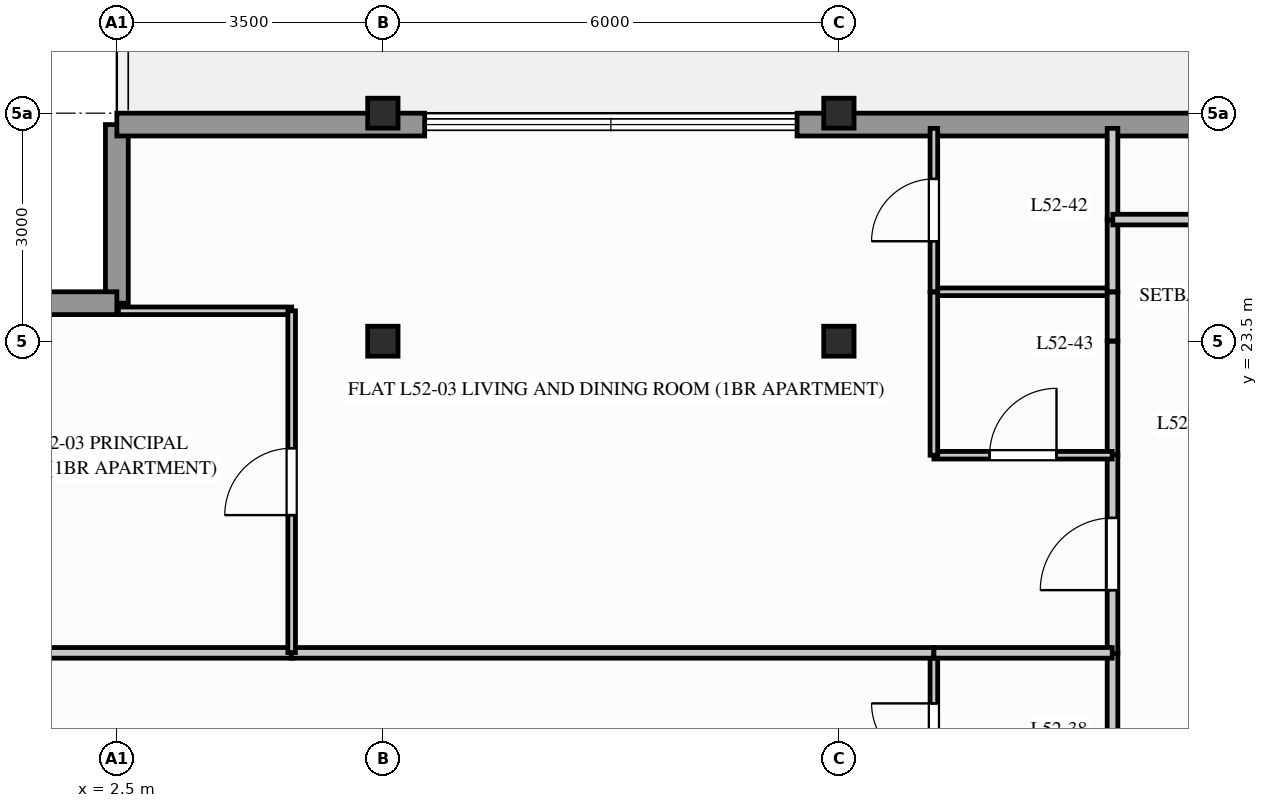
"""IFC4 building model, lengths in metres.
Left out: names, types, materials, properties, quantities, classifications, styles, units other than length and angle.
Written with IfcOpenShell. Run it as: python <this file> out.ifc"""

import sys

from ifc_helpers import new_model, si_unit, direction, frame, frame_2d, origin, origin_2d, place, context, subcontext, project, spatial, rectangle, i_section, extrude, element, fill, save


model = new_model("IFC4")
c1 = context("Model", 3, precision=1e-05, world=origin(), true_north=direction((0.0, 1.0)))
c2 = subcontext(c1, "Body", "Model", "MODEL_VIEW")
j1 = project(units=[si_unit("LENGTHUNIT", "METRE"), si_unit("PLANEANGLEUNIT", "RADIAN")], contexts=[c1])
p1 = place(None, origin())
s1 = spatial("IfcSite", under=j1, at=p1, CompositionType="ELEMENT")
p2 = place(p1, origin())
s2 = spatial("IfcBuilding", under=s1, at=p2, CompositionType="ELEMENT")
p3 = place(p2, frame((0.0, 0.0, 172.8)))
s3 = spatial("IfcBuildingStorey", under=s2, at=p3, CompositionType="ELEMENT", Elevation=172.8)
for number, where, z_axis, x_axis in (
    (1, (6.0, 23.5, 0.0), (0.0, 0.0, 1.0), (1.0, 0.0, 0.0)),
    (2, (6.0, 26.5, 0.0), (0.0, 0.0, 1.0), (1.0, 0.0, 0.0)),
    (3, (12.0, 23.5, 0.0), (0.0, 0.0, 1.0), (1.0, 0.0, 0.0)),
    (4, (12.0, 26.5, 0.0), (0.0, 0.0, 1.0), (1.0, 0.0, 0.0)),
):
    element("IfcColumn", number, at=place(p3, frame(where, z_axis=z_axis, x_axis=x_axis)), inside=s3, PredefinedType="COLUMN", context=c2, shape_type="SweptSolid", body=[
        extrude(i_section(OverallWidth=0.399, OverallDepth=0.394, WebThickness=0.023, FlangeThickness=0.037, FilletRadius=0.015, at=origin_2d()), origin(), (0.0, 0.0, 1.0), 3.1),
    ])
for number, where, z_axis, x_axis in (
    (5, (2.5, 26.35, 0.0), (0.0, 0.0, 1.0), (0.0, -1.0, 0.0)),
    (6, (2.5, 24.0, 0.0), (0.0, 0.0, 1.0), (-1.0, 0.0, 0.0)),
):
    element("IfcWall", number, at=place(p3, frame(where, z_axis=z_axis, x_axis=x_axis)), inside=s3, PredefinedType="STANDARD", context=c2, shape_type="SweptSolid", body=[
        extrude(rectangle(XDim=2.35, YDim=0.3, at=frame_2d((1.175, 0.0))), origin(), (0.0, 0.0, 1.0), 2.89),
    ])
p4 = place(p3, frame((2.5, 26.35, 0.0), z_axis=(0.0, 0.0, 1.0), x_axis=(1.0, 0.0, 0.0)))
e7 = element("IfcWall", 7, at=p4, inside=s3, PredefinedType="STANDARD", context=c2, shape_type="SweptSolid", body=[
    extrude(rectangle(XDim=4.05, YDim=0.3, at=frame_2d((2.025, 0.0))), origin(), (0.0, 0.0, 1.0), 2.89),
])
p5 = place(p3, frame((11.45, 26.35, 0.0), z_axis=(0.0, 0.0, 1.0), x_axis=(1.0, 0.0, 0.0)))
e8 = element("IfcWall", 8, at=p5, inside=s3, PredefinedType="STANDARD", context=c2, shape_type="SweptSolid", body=[
    extrude(rectangle(XDim=6.05, YDim=0.3, at=frame_2d((3.025, 0.0))), origin(), (0.0, 0.0, 1.0), 2.332),
])
p6 = place(p3, frame((15.6, 17.239, 0.0), z_axis=(0.0, 0.0, 1.0), x_axis=(0.0, 1.0, 0.0)))
e9 = element("IfcWall", 9, at=p6, inside=s3, PredefinedType="PARTITIONING", context=c2, shape_type="SweptSolid", body=[
    extrude(rectangle(XDim=2.173, YDim=0.14, at=frame_2d((1.086, 0.0))), origin(), (0.0, 0.0, 1.0), 2.89),
])
p7 = place(p3, frame((15.6, 21.989, 0.0), z_axis=(0.0, 0.0, 1.0), x_axis=(0.0, 1.0, 0.0)))
e10 = element("IfcWall", 10, at=p7, inside=s3, PredefinedType="PARTITIONING", context=c2, shape_type="SweptSolid", body=[
    extrude(rectangle(XDim=1.511, YDim=0.14, at=frame_2d((0.756, 0.0))), origin(), (0.0, 0.0, 1.0), 2.253),
])
p8 = place(p3, frame((15.6, 19.393, 0.0), z_axis=(0.0, 0.0, 1.0), x_axis=(0.0, 1.0, 0.0)))
e11 = element("IfcWall", 11, at=p8, inside=s3, PredefinedType="PARTITIONING", context=c2, shape_type="SweptSolid", body=[
    extrude(rectangle(XDim=2.615, YDim=0.14, at=frame_2d((1.307, 0.0))), origin(), (0.0, 0.0, 1.0), 2.562),
])
p9 = place(p8, frame((0.832, 0.0, 0.0)))
e12 = element("IfcOpeningElement", 12, at=p9, cuts=e11, PredefinedType="OPENING", context=c2, shape_type="SweptSolid", body=[
    extrude(rectangle(XDim=0.95, YDim=2.05, at=frame_2d((0.475, 1.025))), frame((0.0, 0.08, 0.0), z_axis=(0.0, -1.0, 0.0), x_axis=(1.0, 0.0, 0.0)), (0.0, 0.0, 1.0), 0.16),
])
p10 = place(p3, frame((13.25, 17.25, 0.0), z_axis=(0.0, 0.0, 1.0), x_axis=(0.0, 1.0, 0.0)))
e13 = element("IfcWall", 13, at=p10, inside=s3, PredefinedType="PARTITIONING", context=c2, shape_type="SweptSolid", body=[
    extrude(rectangle(XDim=2.15, YDim=0.1, at=frame_2d((1.075, 0.0))), origin(), (0.0, 0.0, 1.0), 2.89),
])
p11 = place(p10, frame((0.665, 0.0, 0.0)))
e14 = element("IfcOpeningElement", 14, at=p11, cuts=e13, PredefinedType="OPENING", context=c2, shape_type="SweptSolid", body=[
    extrude(rectangle(XDim=0.82, YDim=2.02, at=frame_2d((0.41, 1.01))), frame((0.0, 0.06, 0.0), z_axis=(0.0, -1.0, 0.0), x_axis=(1.0, 0.0, 0.0)), (0.0, 0.0, 1.0), 0.12),
])
p12 = place(p3, frame((13.25, 19.4, 0.0), z_axis=(0.0, 0.0, 1.0), x_axis=(1.0, 0.0, 0.0)))
e15 = element("IfcWall", 15, at=p12, inside=s3, PredefinedType="PARTITIONING", context=c2, shape_type="SweptSolid", body=[
    extrude(rectangle(XDim=2.346, YDim=0.14, at=frame_2d((1.173, 0.0))), origin(), (0.0, 0.0, 1.0), 2.89),
])
p13 = place(p3, frame((0.2, 19.4, 0.0), z_axis=(0.0, 0.0, 1.0), x_axis=(1.0, 0.0, 0.0)))
e16 = element("IfcWall", 16, at=p13, inside=s3, PredefinedType="PARTITIONING", context=c2, shape_type="SweptSolid", body=[
    extrude(rectangle(XDim=4.611, YDim=0.14, at=frame_2d((2.306, 0.0))), origin(), (0.0, 0.0, 1.0), 2.89),
])
p14 = place(p3, frame((4.793, 19.4, 0.0), z_axis=(0.0, 0.0, 1.0), x_axis=(1.0, 0.0, 0.0)))
e17 = element("IfcWall", 17, at=p14, inside=s3, PredefinedType="PARTITIONING", context=c2, shape_type="SweptSolid", body=[
    extrude(rectangle(XDim=8.453, YDim=0.14, at=frame_2d((4.227, 0.0))), origin(), (0.0, 0.0, 1.0), 2.253),
])
p15 = place(p3, frame((13.25, 24.15, 0.0), z_axis=(0.0, 0.0, 1.0), x_axis=(1.0, 0.0, 0.0)))
e18 = element("IfcWall", 18, at=p15, inside=s3, PredefinedType="PARTITIONING", context=c2, shape_type="SweptSolid", body=[
    extrude(rectangle(XDim=2.35, YDim=0.1, at=frame_2d((1.175, 0.0))), origin(), (0.0, 0.0, 1.0), 2.89),
])
p16 = place(p3, frame((13.25, 24.15, 0.0), z_axis=(0.0, 0.0, 1.0), x_axis=(0.0, 1.0, 0.0)))
e19 = element("IfcWall", 19, at=p16, inside=s3, PredefinedType="PARTITIONING", context=c2, shape_type="SweptSolid", body=[
    extrude(rectangle(XDim=2.15, YDim=0.1, at=frame_2d((1.075, 0.0))), origin(), (0.0, 0.0, 1.0), 2.89),
])
p17 = place(p16, frame((0.665, 0.0, 0.0)))
e20 = element("IfcOpeningElement", 20, at=p17, cuts=e19, PredefinedType="OPENING", context=c2, shape_type="SweptSolid", body=[
    extrude(rectangle(XDim=0.82, YDim=2.02, at=frame_2d((0.41, 1.01))), frame((0.0, 0.06, 0.0), z_axis=(0.0, -1.0, 0.0), x_axis=(1.0, 0.0, 0.0)), (0.0, 0.0, 1.0), 0.12),
])
p18 = place(p3, frame((15.6, 24.15, 0.0), z_axis=(0.0, 0.0, 1.0), x_axis=(0.0, 1.0, 0.0)))
e21 = element("IfcWall", 21, at=p18, inside=s3, PredefinedType="PARTITIONING", context=c2, shape_type="SweptSolid", body=[
    extrude(rectangle(XDim=0.961, YDim=0.14, at=frame_2d((0.481, 0.0))), origin(), (0.0, 0.0, 1.0), 2.89),
])
p19 = place(p3, frame((15.6, 25.093, 0.0), z_axis=(0.0, 0.0, 1.0), x_axis=(0.0, 1.0, 0.0)))
e22 = element("IfcWall", 22, at=p19, inside=s3, PredefinedType="PARTITIONING", context=c2, shape_type="SweptSolid", body=[
    extrude(rectangle(XDim=1.207, YDim=0.14, at=frame_2d((0.604, 0.0))), origin(), (0.0, 0.0, 1.0), 2.89),
])
p20 = place(p3, frame((13.25, 22.0, 0.0), z_axis=(0.0, 0.0, 1.0), x_axis=(1.0, 0.0, 0.0)))
e23 = element("IfcWall", 23, at=p20, inside=s3, PredefinedType="PARTITIONING", context=c2, shape_type="SweptSolid", body=[
    extrude(rectangle(XDim=2.346, YDim=0.1, at=frame_2d((1.173, 0.0))), origin(), (0.0, 0.0, 1.0), 2.89),
])
p21 = place(p20, frame((0.733, 0.0, 0.0)))
e24 = element("IfcOpeningElement", 24, at=p21, cuts=e23, PredefinedType="OPENING", context=c2, shape_type="SweptSolid", body=[
    extrude(rectangle(XDim=0.88, YDim=2.04, at=frame_2d((0.44, 1.02))), frame((0.0, 0.06, 0.0), z_axis=(0.0, -1.0, 0.0), x_axis=(1.0, 0.0, 0.0)), (0.0, 0.0, 1.0), 0.12),
])
p22 = place(p3, frame((13.25, 22.0, 0.0), z_axis=(0.0, 0.0, 1.0), x_axis=(0.0, 1.0, 0.0)))
e25 = element("IfcWall", 25, at=p22, inside=s3, PredefinedType="PARTITIONING", context=c2, shape_type="SweptSolid", body=[
    extrude(rectangle(XDim=2.146, YDim=0.1, at=frame_2d((1.073, 0.0))), origin(), (0.0, 0.0, 1.0), 2.253),
])
p23 = place(p3, frame((15.6, 23.504, 0.0), z_axis=(0.0, 0.0, 1.0), x_axis=(0.0, 1.0, 0.0)))
e26 = element("IfcWall", 26, at=p23, inside=s3, PredefinedType="PARTITIONING", context=c2, shape_type="SweptSolid", body=[
    extrude(rectangle(XDim=0.642, YDim=0.14, at=frame_2d((0.321, 0.0))), origin(), (0.0, 0.0, 1.0), 2.253),
])
p24 = place(p3, frame((2.52, 23.9, 0.0), z_axis=(0.0, 0.0, 1.0), x_axis=(1.0, 0.0, 0.0)))
e27 = element("IfcWall", 27, at=p24, inside=s3, PredefinedType="PARTITIONING", context=c2, shape_type="SweptSolid", body=[
    extrude(rectangle(XDim=2.28, YDim=0.1, at=frame_2d((1.14, 0.0))), origin(), (0.0, 0.0, 1.0), 2.89),
])
p25 = place(p3, frame((4.8, 19.404, 0.0), z_axis=(0.0, 0.0, 1.0), x_axis=(0.0, 1.0, 0.0)))
e28 = element("IfcWall", 28, at=p25, inside=s3, PredefinedType="PARTITIONING", context=c2, shape_type="SweptSolid", body=[
    extrude(rectangle(XDim=4.496, YDim=0.1, at=frame_2d((2.248, 0.0))), origin(), (0.0, 0.0, 1.0), 2.253),
])
p26 = place(p25, frame((1.808, 0.0, 0.0)))
e29 = element("IfcOpeningElement", 29, at=p26, cuts=e28, PredefinedType="OPENING", context=c2, shape_type="SweptSolid", body=[
    extrude(rectangle(XDim=0.88, YDim=2.04, at=frame_2d((0.44, 1.02))), frame((0.0, 0.06, 0.0), z_axis=(0.0, -1.0, 0.0), x_axis=(1.0, 0.0, 0.0)), (0.0, 0.0, 1.0), 0.12),
])
p27 = place(p3, frame((15.604, 25.1, 0.0), z_axis=(0.0, 0.0, 1.0), x_axis=(1.0, 0.0, 0.0)))
e30 = element("IfcWall", 30, at=p27, inside=s3, PredefinedType="PARTITIONING", context=c2, shape_type="SweptSolid", body=[
    extrude(rectangle(XDim=11.407, YDim=0.14, at=frame_2d((5.704, 0.0))), origin(), (0.0, 0.0, 1.0), 2.253),
])
p28 = place(p27, frame((4.789, 0.0, 0.0)))
e31 = element("IfcOpeningElement", 31, at=p28, cuts=e30, PredefinedType="OPENING", context=c2, shape_type="SweptSolid", body=[
    extrude(rectangle(XDim=0.95, YDim=2.05, at=frame_2d((0.475, 1.025))), frame((0.0, 0.08, 0.0), z_axis=(0.0, -1.0, 0.0), x_axis=(1.0, 0.0, 0.0)), (0.0, 0.0, 1.0), 0.16),
])
p29 = place(p9, origin())
e32 = element("IfcDoor", 32, at=p29, inside=s3, OperationType="SINGLE_SWING_LEFT", PredefinedType="DOOR", context=c2, shape_type="SweptSolid", body=[
    extrude(rectangle(XDim=0.95, YDim=2.05, at=frame_2d((0.475, 1.025))), frame((0.0, 0.025, 0.0), z_axis=(0.0, -1.0, 0.0), x_axis=(1.0, 0.0, 0.0)), (0.0, 0.0, 1.0), 0.05),
])
fill(e12, e32)
p30 = place(p11, origin())
e33 = element("IfcDoor", 33, at=p30, inside=s3, OperationType="SINGLE_SWING_RIGHT", PredefinedType="DOOR", context=c2, shape_type="SweptSolid", body=[
    extrude(rectangle(XDim=0.82, YDim=2.02, at=frame_2d((0.41, 1.01))), frame((0.0, 0.025, 0.0), z_axis=(0.0, -1.0, 0.0), x_axis=(1.0, 0.0, 0.0)), (0.0, 0.0, 1.0), 0.05),
])
fill(e14, e33)
p31 = place(p17, origin())
e34 = element("IfcDoor", 34, at=p31, inside=s3, OperationType="SINGLE_SWING_LEFT", PredefinedType="DOOR", context=c2, shape_type="SweptSolid", body=[
    extrude(rectangle(XDim=0.82, YDim=2.02, at=frame_2d((0.41, 1.01))), frame((0.0, 0.025, 0.0), z_axis=(0.0, -1.0, 0.0), x_axis=(1.0, 0.0, 0.0)), (0.0, 0.0, 1.0), 0.05),
])
fill(e20, e34)
p32 = place(p21, origin())
e35 = element("IfcDoor", 35, at=p32, inside=s3, OperationType="SINGLE_SWING_RIGHT", PredefinedType="DOOR", context=c2, shape_type="SweptSolid", body=[
    extrude(rectangle(XDim=0.88, YDim=2.04, at=frame_2d((0.44, 1.02))), frame((0.0, 0.025, 0.0), z_axis=(0.0, -1.0, 0.0), x_axis=(1.0, 0.0, 0.0)), (0.0, 0.0, 1.0), 0.05),
])
fill(e24, e35)
p33 = place(p26, origin())
e36 = element("IfcDoor", 36, at=p33, inside=s3, OperationType="SINGLE_SWING_LEFT", PredefinedType="DOOR", context=c2, shape_type="SweptSolid", body=[
    extrude(rectangle(XDim=0.88, YDim=2.04, at=frame_2d((0.44, 1.02))), frame((0.0, 0.025, 0.0), z_axis=(0.0, -1.0, 0.0), x_axis=(1.0, 0.0, 0.0)), (0.0, 0.0, 1.0), 0.05),
])
fill(e29, e36)
save(model, sys.argv[1])
